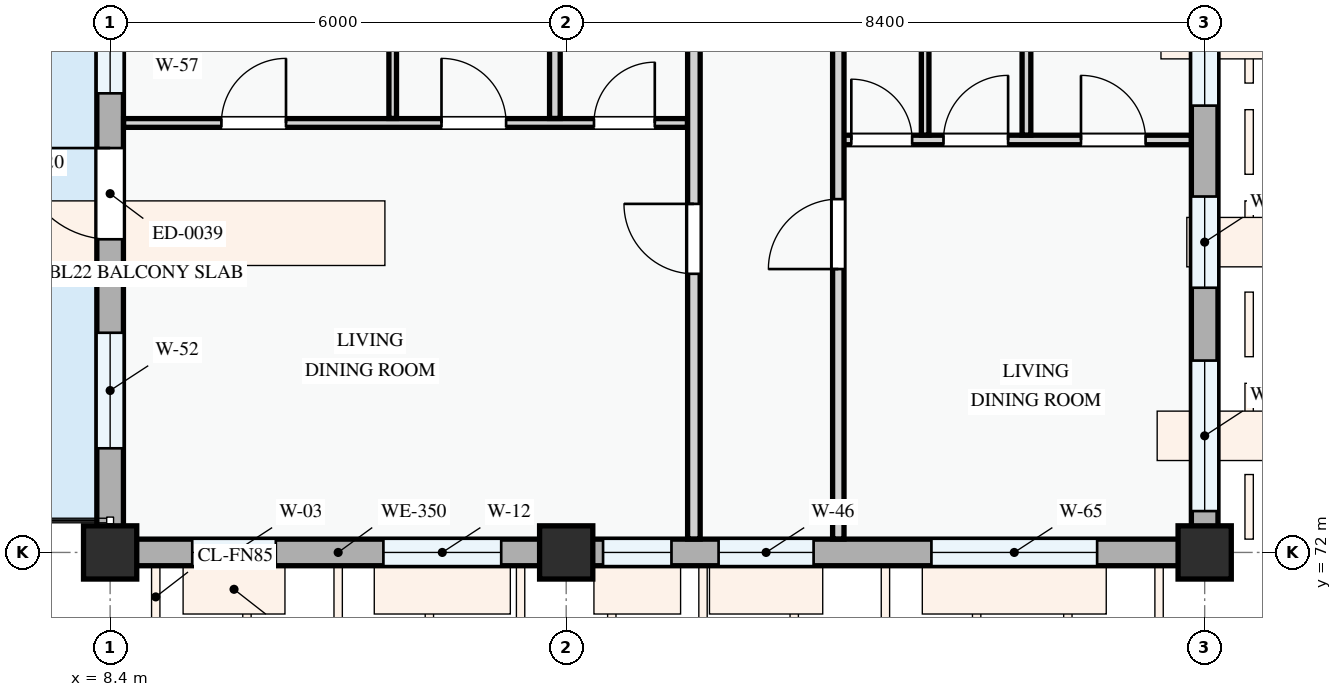
"""IFC4 building model, lengths in metres.
Left out: names, types, materials, properties, quantities, classifications, styles, units other than length and angle.
Written with IfcOpenShell. Run it as: python <this file> out.ifc"""

import sys

from ifc_helpers import new_model, si_unit, direction, frame, frame_2d, origin, origin_2d, place, context, subcontext, project, spatial, rectangle, extrude, element, fill, save


model = new_model("IFC4")
c1 = context("Model", 3, precision=1e-05, world=origin(), true_north=direction((0.0, 1.0)))
c2 = subcontext(c1, "Body", "Model", "MODEL_VIEW")
j1 = project(units=[si_unit("LENGTHUNIT", "METRE"), si_unit("PLANEANGLEUNIT", "RADIAN")], contexts=[c1])
p1 = place(None, origin())
s1 = spatial("IfcSite", under=j1, at=p1, CompositionType="ELEMENT")
p2 = place(p1, origin())
s2 = spatial("IfcBuilding", under=s1, at=p2, CompositionType="ELEMENT")
p3 = place(p2, frame((0.0, 0.0, 14.7)))
s3 = spatial("IfcBuildingStorey", under=s2, at=p3, CompositionType="ELEMENT", Elevation=14.7)
for number, where, z_axis, x_axis in (
    (1, (8.4, 72.0, 0.0), (0.0, 0.0, 1.0), (1.0, 0.0, 0.0)),
    (2, (14.4, 72.0, 0.0), (0.0, 0.0, 1.0), (1.0, 0.0, 0.0)),
    (3, (22.8, 72.0, 0.0), (0.0, 0.0, 1.0), (1.0, 0.0, 0.0)),
):
    element("IfcColumn", number, at=place(p3, frame(where, z_axis=z_axis, x_axis=x_axis)), inside=s3, PredefinedType="COLUMN", context=c2, shape_type="SweptSolid", body=[
        extrude(rectangle(XDim=0.7, YDim=0.7, at=origin_2d()), origin(), (0.0, 0.0, 1.0), 3.3),
    ])
p4 = place(p3, frame((8.4, 80.4, 0.0), z_axis=(0.0, 0.0, 1.0), x_axis=(0.0, -1.0, 0.0)))
e4 = element("IfcWall", 4, at=p4, inside=s3, PredefinedType="STANDARD", context=c2, shape_type="SweptSolid", body=[
    extrude(rectangle(XDim=8.4, YDim=0.35, at=frame_2d((4.2, 0.0))), origin(), (0.0, 0.0, 1.0), 2.345),
])
p5 = place(p4, frame((3.08, 0.0, 0.0)))
e5 = element("IfcOpeningElement", 5, at=p5, cuts=e4, PredefinedType="OPENING", context=c2, shape_type="SweptSolid", body=[
    extrude(rectangle(XDim=1.2, YDim=2.15, at=frame_2d((0.6, 1.075))), frame((0.0, 0.185, 0.0), z_axis=(0.0, -1.0, 0.0), x_axis=(1.0, 0.0, 0.0)), (0.0, 0.0, 1.0), 0.37),
])
p6 = place(p4, frame((0.58, 0.0, 0.78)))
e6 = element("IfcOpeningElement", 6, at=p6, cuts=e4, PredefinedType="OPENING", context=c2, shape_type="SweptSolid", body=[
    extrude(rectangle(XDim=1.78, YDim=1.42, at=frame_2d((0.89, 0.71))), frame((0.0, 0.185, 0.0), z_axis=(0.0, -1.0, 0.0), x_axis=(1.0, 0.0, 0.0)), (0.0, 0.0, 1.0), 0.37),
])
p7 = place(p4, frame((5.51, 0.0, 0.78)))
e7 = element("IfcOpeningElement", 7, at=p7, cuts=e4, PredefinedType="OPENING", context=c2, shape_type="SweptSolid", body=[
    extrude(rectangle(XDim=1.52, YDim=1.42, at=frame_2d((0.76, 0.71))), frame((0.0, 0.185, 0.0), z_axis=(0.0, -1.0, 0.0), x_axis=(1.0, 0.0, 0.0)), (0.0, 0.0, 1.0), 0.37),
])
p8 = place(p3, frame((8.4, 72.0, 0.0), z_axis=(0.0, 0.0, 1.0), x_axis=(1.0, 0.0, 0.0)))
e8 = element("IfcWall", 8, at=p8, inside=s3, PredefinedType="STANDARD", context=c2, shape_type="SweptSolid", body=[
    extrude(rectangle(XDim=6.0, YDim=0.35, at=frame_2d((3.0, 0.0))), origin(), (0.0, 0.0, 1.0), 2.475),
])
p9 = place(p8, frame((1.08, 0.0, 0.78)))
e9 = element("IfcOpeningElement", 9, at=p9, cuts=e8, PredefinedType="OPENING", context=c2, shape_type="SweptSolid", body=[
    extrude(rectangle(XDim=1.1, YDim=1.3, at=frame_2d((0.55, 0.65))), frame((0.0, 0.185, 0.0), z_axis=(0.0, -1.0, 0.0), x_axis=(1.0, 0.0, 0.0)), (0.0, 0.0, 1.0), 0.37),
])
p10 = place(p8, frame((3.595, 0.0, 0.78)))
e10 = element("IfcOpeningElement", 10, at=p10, cuts=e8, PredefinedType="OPENING", context=c2, shape_type="SweptSolid", body=[
    extrude(rectangle(XDim=1.55, YDim=1.4, at=frame_2d((0.775, 0.7))), frame((0.0, 0.185, 0.0), z_axis=(0.0, -1.0, 0.0), x_axis=(1.0, 0.0, 0.0)), (0.0, 0.0, 1.0), 0.37),
])
p11 = place(p3, frame((14.4, 72.0, 0.0), z_axis=(0.0, 0.0, 1.0), x_axis=(1.0, 0.0, 0.0)))
e11 = element("IfcWall", 11, at=p11, inside=s3, PredefinedType="STANDARD", context=c2, shape_type="SweptSolid", body=[
    extrude(rectangle(XDim=8.4, YDim=0.35, at=frame_2d((4.2, 0.0))), origin(), (0.0, 0.0, 1.0), 2.375),
])
p12 = place(p11, frame((0.485, 0.0, 0.78)))
e12 = element("IfcOpeningElement", 12, at=p12, cuts=e11, PredefinedType="OPENING", context=c2, shape_type="SweptSolid", body=[
    extrude(rectangle(XDim=0.9, YDim=1.2, at=frame_2d((0.45, 0.6))), frame((0.0, 0.185, 0.0), z_axis=(0.0, -1.0, 0.0), x_axis=(1.0, 0.0, 0.0)), (0.0, 0.0, 1.0), 0.37),
])
p13 = place(p11, frame((2.005, 0.0, 0.78)))
e13 = element("IfcOpeningElement", 13, at=p13, cuts=e11, PredefinedType="OPENING", context=c2, shape_type="SweptSolid", body=[
    extrude(rectangle(XDim=1.25, YDim=1.3, at=frame_2d((0.625, 0.65))), frame((0.0, 0.185, 0.0), z_axis=(0.0, -1.0, 0.0), x_axis=(1.0, 0.0, 0.0)), (0.0, 0.0, 1.0), 0.37),
])
p14 = place(p11, frame((4.805, 0.0, 0.78)))
e14 = element("IfcOpeningElement", 14, at=p14, cuts=e11, PredefinedType="OPENING", context=c2, shape_type="SweptSolid", body=[
    extrude(rectangle(XDim=2.18, YDim=1.48, at=frame_2d((1.09, 0.74))), frame((0.0, 0.185, 0.0), z_axis=(0.0, -1.0, 0.0), x_axis=(1.0, 0.0, 0.0)), (0.0, 0.0, 1.0), 0.37),
])
p15 = place(p3, frame((22.8, 72.0, 0.0), z_axis=(0.0, 0.0, 1.0), x_axis=(0.0, 1.0, 0.0)))
e15 = element("IfcWall", 15, at=p15, inside=s3, PredefinedType="STANDARD", context=c2, shape_type="SweptSolid", body=[
    extrude(rectangle(XDim=8.4, YDim=0.35, at=frame_2d((4.2, 0.0))), origin(), (0.0, 0.0, 1.0), 2.425),
])
p16 = place(p15, frame((0.544, 0.0, 0.78)))
e16 = element("IfcOpeningElement", 16, at=p16, cuts=e15, PredefinedType="OPENING", context=c2, shape_type="SweptSolid", body=[
    extrude(rectangle(XDim=1.98, YDim=1.5, at=frame_2d((0.99, 0.75))), frame((0.0, 0.185, 0.0), z_axis=(0.0, -1.0, 0.0), x_axis=(1.0, 0.0, 0.0)), (0.0, 0.0, 1.0), 0.37),
])
p17 = place(p15, frame((3.482, 0.0, 0.78)))
e17 = element("IfcOpeningElement", 17, at=p17, cuts=e15, PredefinedType="OPENING", context=c2, shape_type="SweptSolid", body=[
    extrude(rectangle(XDim=1.2, YDim=1.35, at=frame_2d((0.6, 0.675))), frame((0.0, 0.185, 0.0), z_axis=(0.0, -1.0, 0.0), x_axis=(1.0, 0.0, 0.0)), (0.0, 0.0, 1.0), 0.37),
])
p18 = place(p15, frame((5.878, 0.0, 0.78)))
e18 = element("IfcOpeningElement", 18, at=p18, cuts=e15, PredefinedType="OPENING", context=c2, shape_type="SweptSolid", body=[
    extrude(rectangle(XDim=1.88, YDim=1.52, at=frame_2d((0.94, 0.76))), frame((0.0, 0.185, 0.0), z_axis=(0.0, -1.0, 0.0), x_axis=(1.0, 0.0, 0.0)), (0.0, 0.0, 1.0), 0.37),
])
p19 = place(p3, frame((8.577, 77.65, 0.0), z_axis=(0.0, 0.0, 1.0), x_axis=(1.0, 0.0, 0.0)))
e19 = element("IfcWall", 19, at=p19, inside=s3, PredefinedType="PARTITIONING", context=c2, shape_type="SweptSolid", body=[
    extrude(rectangle(XDim=7.419, YDim=0.115, at=frame_2d((3.709, 0.0))), origin(), (0.0, 0.0, 1.0), 3.0),
])
p20 = place(p19, frame((1.287, 0.0, 0.0)))
e20 = element("IfcOpeningElement", 20, at=p20, cuts=e19, PredefinedType="OPENING", context=c2, shape_type="SweptSolid", body=[
    extrude(rectangle(XDim=0.85, YDim=2.1, at=frame_2d((0.425, 1.05))), frame((0.0, 0.067, 0.0), z_axis=(0.0, -1.0, 0.0), x_axis=(1.0, 0.0, 0.0)), (0.0, 0.0, 1.0), 0.135),
])
p21 = place(p19, frame((4.182, 0.0, 0.0)))
e21 = element("IfcOpeningElement", 21, at=p21, cuts=e19, PredefinedType="OPENING", context=c2, shape_type="SweptSolid", body=[
    extrude(rectangle(XDim=0.85, YDim=2.1, at=frame_2d((0.425, 1.05))), frame((0.0, 0.067, 0.0), z_axis=(0.0, -1.0, 0.0), x_axis=(1.0, 0.0, 0.0)), (0.0, 0.0, 1.0), 0.135),
])
p22 = place(p19, frame((6.189, 0.0, 0.0)))
e22 = element("IfcOpeningElement", 22, at=p22, cuts=e19, PredefinedType="OPENING", context=c2, shape_type="SweptSolid", body=[
    extrude(rectangle(XDim=0.8, YDim=2.1, at=frame_2d((0.4, 1.05))), frame((0.0, 0.067, 0.0), z_axis=(0.0, -1.0, 0.0), x_axis=(1.0, 0.0, 0.0)), (0.0, 0.0, 1.0), 0.135),
])
p23 = place(p3, frame((12.118, 77.709, 0.0), z_axis=(0.0, 0.0, 1.0), x_axis=(0.0, 1.0, 0.0)))
e23 = element("IfcWall", 23, at=p23, inside=s3, PredefinedType="PARTITIONING", context=c2, shape_type="SweptSolid", body=[
    extrude(rectangle(XDim=5.436, YDim=0.1, at=frame_2d((2.718, 0.0))), origin(), (0.0, 0.0, 1.0), 3.0),
])
p24 = place(p3, frame((14.251, 77.709, 0.0), z_axis=(0.0, 0.0, 1.0), x_axis=(0.0, 1.0, 0.0)))
e24 = element("IfcWall", 24, at=p24, inside=s3, PredefinedType="PARTITIONING", context=c2, shape_type="SweptSolid", body=[
    extrude(rectangle(XDim=5.436, YDim=0.14, at=frame_2d((2.718, 0.0))), origin(), (0.0, 0.0, 1.0), 2.425),
])
p25 = place(p3, frame((17.98, 77.427, 0.0), z_axis=(0.0, 0.0, 1.0), x_axis=(1.0, 0.0, 0.0)))
e25 = element("IfcWall", 25, at=p25, inside=s3, PredefinedType="PARTITIONING", context=c2, shape_type="SweptSolid", body=[
    extrude(rectangle(XDim=4.643, YDim=0.125, at=frame_2d((2.322, 0.0))), origin(), (0.0, 0.0, 1.0), 3.0),
])
p26 = place(p25, frame((0.171, 0.0, 0.0)))
e26 = element("IfcOpeningElement", 26, at=p26, cuts=e25, PredefinedType="OPENING", context=c2, shape_type="SweptSolid", body=[
    extrude(rectangle(XDim=0.8, YDim=2.1, at=frame_2d((0.4, 1.05))), frame((0.0, 0.073, 0.0), z_axis=(0.0, -1.0, 0.0), x_axis=(1.0, 0.0, 0.0)), (0.0, 0.0, 1.0), 0.145),
])
p27 = place(p25, frame((1.384, 0.0, 0.0)))
e27 = element("IfcOpeningElement", 27, at=p27, cuts=e25, PredefinedType="OPENING", context=c2, shape_type="SweptSolid", body=[
    extrude(rectangle(XDim=0.85, YDim=2.1, at=frame_2d((0.425, 1.05))), frame((0.0, 0.073, 0.0), z_axis=(0.0, -1.0, 0.0), x_axis=(1.0, 0.0, 0.0)), (0.0, 0.0, 1.0), 0.145),
])
p28 = place(p25, frame((3.193, 0.0, 0.0)))
e28 = element("IfcOpeningElement", 28, at=p28, cuts=e25, PredefinedType="OPENING", context=c2, shape_type="SweptSolid", body=[
    extrude(rectangle(XDim=0.85, YDim=2.1, at=frame_2d((0.425, 1.05))), frame((0.0, 0.073, 0.0), z_axis=(0.0, -1.0, 0.0), x_axis=(1.0, 0.0, 0.0)), (0.0, 0.0, 1.0), 0.145),
])
p29 = place(p3, frame((20.455, 77.491, 0.0), z_axis=(0.0, 0.0, 1.0), x_axis=(0.0, 1.0, 0.0)))
e29 = element("IfcWall", 29, at=p29, inside=s3, PredefinedType="PARTITIONING", context=c2, shape_type="SweptSolid", body=[
    extrude(rectangle(XDim=5.647, YDim=0.115, at=frame_2d((2.823, 0.0))), origin(), (0.0, 0.0, 1.0), 3.0),
])
p30 = place(p3, frame((19.122, 77.491, 0.0), z_axis=(0.0, 0.0, 1.0), x_axis=(0.0, 1.0, 0.0)))
e30 = element("IfcWall", 30, at=p30, inside=s3, PredefinedType="PARTITIONING", context=c2, shape_type="SweptSolid", body=[
    extrude(rectangle(XDim=5.647, YDim=0.1, at=frame_2d((2.823, 0.0))), origin(), (0.0, 0.0, 1.0), 3.0),
])
p31 = place(p3, frame((16.08, 72.177, 0.0), z_axis=(0.0, 0.0, 1.0), x_axis=(0.0, 1.0, 0.0)))
e31 = element("IfcWall", 31, at=p31, inside=s3, PredefinedType="PARTITIONING", context=c2, shape_type="SweptSolid", body=[
    extrude(rectangle(XDim=37.163, YDim=0.165, at=frame_2d((18.582, 0.0))), origin(), (0.0, 0.0, 1.0), 3.0),
])
p32 = place(p31, frame((3.489, 0.0, 0.0)))
e32 = element("IfcOpeningElement", 32, at=p32, cuts=e31, PredefinedType="OPENING", context=c2, shape_type="SweptSolid", body=[
    extrude(rectangle(XDim=0.92, YDim=2.1, at=frame_2d((0.46, 1.05))), frame((0.0, 0.093, 0.0), z_axis=(0.0, -1.0, 0.0), x_axis=(1.0, 0.0, 0.0)), (0.0, 0.0, 1.0), 0.185),
])
p33 = place(p31, frame((16.543, 0.0, 0.0)))
e33 = element("IfcOpeningElement", 33, at=p33, cuts=e31, PredefinedType="OPENING", context=c2, shape_type="SweptSolid", body=[
    extrude(rectangle(XDim=0.92, YDim=2.1, at=frame_2d((0.46, 1.05))), frame((0.0, 0.093, 0.0), z_axis=(0.0, -1.0, 0.0), x_axis=(1.0, 0.0, 0.0)), (0.0, 0.0, 1.0), 0.185),
])
p34 = place(p31, frame((25.152, 0.0, 0.0)))
e34 = element("IfcOpeningElement", 34, at=p34, cuts=e31, PredefinedType="OPENING", context=c2, shape_type="SweptSolid", body=[
    extrude(rectangle(XDim=0.92, YDim=2.1, at=frame_2d((0.46, 1.05))), frame((0.0, 0.093, 0.0), z_axis=(0.0, -1.0, 0.0), x_axis=(1.0, 0.0, 0.0)), (0.0, 0.0, 1.0), 0.185),
])
p35 = place(p3, frame((17.98, 72.177, 0.0), z_axis=(0.0, 0.0, 1.0), x_axis=(0.0, 1.0, 0.0)))
e35 = element("IfcWall", 35, at=p35, inside=s3, PredefinedType="PARTITIONING", context=c2, shape_type="SweptSolid", body=[
    extrude(rectangle(XDim=37.163, YDim=0.15, at=frame_2d((18.582, 0.0))), origin(), (0.0, 0.0, 1.0), 3.0),
])
p36 = place(p35, frame((3.551, 0.0, 0.0)))
e36 = element("IfcOpeningElement", 36, at=p36, cuts=e35, PredefinedType="OPENING", context=c2, shape_type="SweptSolid", body=[
    extrude(rectangle(XDim=0.92, YDim=2.1, at=frame_2d((0.46, 1.05))), frame((0.0, 0.085, 0.0), z_axis=(0.0, -1.0, 0.0), x_axis=(1.0, 0.0, 0.0)), (0.0, 0.0, 1.0), 0.17),
])
p37 = place(p35, frame((16.275, 0.0, 0.0)))
e37 = element("IfcOpeningElement", 37, at=p37, cuts=e35, PredefinedType="OPENING", context=c2, shape_type="SweptSolid", body=[
    extrude(rectangle(XDim=0.96, YDim=2.12, at=frame_2d((0.48, 1.06))), frame((0.0, 0.085, 0.0), z_axis=(0.0, -1.0, 0.0), x_axis=(1.0, 0.0, 0.0)), (0.0, 0.0, 1.0), 0.17),
])
p38 = place(p35, frame((25.128, 0.0, 0.0)))
e38 = element("IfcOpeningElement", 38, at=p38, cuts=e35, PredefinedType="OPENING", context=c2, shape_type="SweptSolid", body=[
    extrude(rectangle(XDim=0.92, YDim=2.1, at=frame_2d((0.46, 1.05))), frame((0.0, 0.085, 0.0), z_axis=(0.0, -1.0, 0.0), x_axis=(1.0, 0.0, 0.0)), (0.0, 0.0, 1.0), 0.17),
])
p39 = place(p5, frame((1.2, 0.0, 0.0), z_axis=(0.0, 0.0, 1.0), x_axis=(-1.0, 0.0, 0.0)))
e39 = element("IfcDoor", 39, at=p39, inside=s3, OperationType="SINGLE_SWING_RIGHT", PredefinedType="DOOR", context=c2, shape_type="SweptSolid", body=[
    extrude(rectangle(XDim=1.2, YDim=2.15, at=frame_2d((0.6, 1.075))), frame((0.0, 0.025, 0.0), z_axis=(0.0, -1.0, 0.0), x_axis=(1.0, 0.0, 0.0)), (0.0, 0.0, 1.0), 0.05),
])
fill(e5, e39)
p40 = place(p6, origin())
e40 = element("IfcWindow", 40, at=p40, inside=s3, PartitioningType="DOUBLE_PANEL_VERTICAL", PredefinedType="WINDOW", context=c2, shape_type="SweptSolid", body=[
    extrude(rectangle(XDim=1.78, YDim=1.42, at=frame_2d((0.89, 0.71))), frame((0.0, 0.03, 0.0), z_axis=(0.0, -1.0, 0.0), x_axis=(1.0, 0.0, 0.0)), (0.0, 0.0, 1.0), 0.06),
])
fill(e6, e40)
p41 = place(p7, origin())
e41 = element("IfcWindow", 41, at=p41, inside=s3, PartitioningType="SINGLE_PANEL", PredefinedType="WINDOW", context=c2, shape_type="SweptSolid", body=[
    extrude(rectangle(XDim=1.52, YDim=1.42, at=frame_2d((0.76, 0.71))), frame((0.0, 0.03, 0.0), z_axis=(0.0, -1.0, 0.0), x_axis=(1.0, 0.0, 0.0)), (0.0, 0.0, 1.0), 0.06),
])
fill(e7, e41)
p42 = place(p9, origin())
e42 = element("IfcWindow", 42, at=p42, inside=s3, PartitioningType="SINGLE_PANEL", PredefinedType="WINDOW", context=c2, shape_type="SweptSolid", body=[
    extrude(rectangle(XDim=1.1, YDim=1.3, at=frame_2d((0.55, 0.65))), frame((0.0, 0.03, 0.0), z_axis=(0.0, -1.0, 0.0), x_axis=(1.0, 0.0, 0.0)), (0.0, 0.0, 1.0), 0.06),
])
fill(e9, e42)
p43 = place(p10, origin())
e43 = element("IfcWindow", 43, at=p43, inside=s3, PartitioningType="SINGLE_PANEL", PredefinedType="WINDOW", context=c2, shape_type="SweptSolid", body=[
    extrude(rectangle(XDim=1.55, YDim=1.4, at=frame_2d((0.775, 0.7))), frame((0.0, 0.03, 0.0), z_axis=(0.0, -1.0, 0.0), x_axis=(1.0, 0.0, 0.0)), (0.0, 0.0, 1.0), 0.06),
])
fill(e10, e43)
p44 = place(p12, origin())
e44 = element("IfcWindow", 44, at=p44, inside=s3, PartitioningType="SINGLE_PANEL", PredefinedType="WINDOW", context=c2, shape_type="SweptSolid", body=[
    extrude(rectangle(XDim=0.9, YDim=1.2, at=frame_2d((0.45, 0.6))), frame((0.0, 0.03, 0.0), z_axis=(0.0, -1.0, 0.0), x_axis=(1.0, 0.0, 0.0)), (0.0, 0.0, 1.0), 0.06),
])
fill(e12, e44)
p45 = place(p13, origin())
e45 = element("IfcWindow", 45, at=p45, inside=s3, PartitioningType="SINGLE_PANEL", PredefinedType="WINDOW", context=c2, shape_type="SweptSolid", body=[
    extrude(rectangle(XDim=1.25, YDim=1.3, at=frame_2d((0.625, 0.65))), frame((0.0, 0.03, 0.0), z_axis=(0.0, -1.0, 0.0), x_axis=(1.0, 0.0, 0.0)), (0.0, 0.0, 1.0), 0.06),
])
fill(e13, e45)
p46 = place(p14, origin())
e46 = element("IfcWindow", 46, at=p46, inside=s3, PartitioningType="DOUBLE_PANEL_VERTICAL", PredefinedType="WINDOW", context=c2, shape_type="SweptSolid", body=[
    extrude(rectangle(XDim=2.18, YDim=1.48, at=frame_2d((1.09, 0.74))), frame((0.0, 0.03, 0.0), z_axis=(0.0, -1.0, 0.0), x_axis=(1.0, 0.0, 0.0)), (0.0, 0.0, 1.0), 0.06),
])
fill(e14, e46)
p47 = place(p16, origin())
e47 = element("IfcWindow", 47, at=p47, inside=s3, PartitioningType="DOUBLE_PANEL_VERTICAL", PredefinedType="WINDOW", context=c2, shape_type="SweptSolid", body=[
    extrude(rectangle(XDim=1.98, YDim=1.5, at=frame_2d((0.99, 0.75))), frame((0.0, 0.03, 0.0), z_axis=(0.0, -1.0, 0.0), x_axis=(1.0, 0.0, 0.0)), (0.0, 0.0, 1.0), 0.06),
])
fill(e16, e47)
p48 = place(p17, origin())
e48 = element("IfcWindow", 48, at=p48, inside=s3, PartitioningType="SINGLE_PANEL", PredefinedType="WINDOW", context=c2, shape_type="SweptSolid", body=[
    extrude(rectangle(XDim=1.2, YDim=1.35, at=frame_2d((0.6, 0.675))), frame((0.0, 0.03, 0.0), z_axis=(0.0, -1.0, 0.0), x_axis=(1.0, 0.0, 0.0)), (0.0, 0.0, 1.0), 0.06),
])
fill(e17, e48)
p49 = place(p18, origin())
e49 = element("IfcWindow", 49, at=p49, inside=s3, PartitioningType="DOUBLE_PANEL_VERTICAL", PredefinedType="WINDOW", context=c2, shape_type="SweptSolid", body=[
    extrude(rectangle(XDim=1.88, YDim=1.52, at=frame_2d((0.94, 0.76))), frame((0.0, 0.03, 0.0), z_axis=(0.0, -1.0, 0.0), x_axis=(1.0, 0.0, 0.0)), (0.0, 0.0, 1.0), 0.06),
])
fill(e18, e49)
p50 = place(p20, origin())
e50 = element("IfcDoor", 50, at=p50, inside=s3, OperationType="SINGLE_SWING_RIGHT", PredefinedType="DOOR", context=c2, shape_type="SweptSolid", body=[
    extrude(rectangle(XDim=0.85, YDim=2.1, at=frame_2d((0.425, 1.05))), frame((0.0, 0.025, 0.0), z_axis=(0.0, -1.0, 0.0), x_axis=(1.0, 0.0, 0.0)), (0.0, 0.0, 1.0), 0.05),
])
fill(e20, e50)
p51 = place(p21, origin())
e51 = element("IfcDoor", 51, at=p51, inside=s3, OperationType="SINGLE_SWING_LEFT", PredefinedType="DOOR", context=c2, shape_type="SweptSolid", body=[
    extrude(rectangle(XDim=0.85, YDim=2.1, at=frame_2d((0.425, 1.05))), frame((0.0, 0.025, 0.0), z_axis=(0.0, -1.0, 0.0), x_axis=(1.0, 0.0, 0.0)), (0.0, 0.0, 1.0), 0.05),
])
fill(e21, e51)
p52 = place(p22, origin())
e52 = element("IfcDoor", 52, at=p52, inside=s3, OperationType="SINGLE_SWING_RIGHT", PredefinedType="DOOR", context=c2, shape_type="SweptSolid", body=[
    extrude(rectangle(XDim=0.8, YDim=2.1, at=frame_2d((0.4, 1.05))), frame((0.0, 0.025, 0.0), z_axis=(0.0, -1.0, 0.0), x_axis=(1.0, 0.0, 0.0)), (0.0, 0.0, 1.0), 0.05),
])
fill(e22, e52)
p53 = place(p26, origin())
e53 = element("IfcDoor", 53, at=p53, inside=s3, OperationType="SINGLE_SWING_LEFT", PredefinedType="DOOR", context=c2, shape_type="SweptSolid", body=[
    extrude(rectangle(XDim=0.8, YDim=2.1, at=frame_2d((0.4, 1.05))), frame((0.0, 0.025, 0.0), z_axis=(0.0, -1.0, 0.0), x_axis=(1.0, 0.0, 0.0)), (0.0, 0.0, 1.0), 0.05),
])
fill(e26, e53)
p54 = place(p27, origin())
e54 = element("IfcDoor", 54, at=p54, inside=s3, OperationType="SINGLE_SWING_RIGHT", PredefinedType="DOOR", context=c2, shape_type="SweptSolid", body=[
    extrude(rectangle(XDim=0.85, YDim=2.1, at=frame_2d((0.425, 1.05))), frame((0.0, 0.025, 0.0), z_axis=(0.0, -1.0, 0.0), x_axis=(1.0, 0.0, 0.0)), (0.0, 0.0, 1.0), 0.05),
])
fill(e27, e54)
p55 = place(p28, origin())
e55 = element("IfcDoor", 55, at=p55, inside=s3, OperationType="SINGLE_SWING_LEFT", PredefinedType="DOOR", context=c2, shape_type="SweptSolid", body=[
    extrude(rectangle(XDim=0.85, YDim=2.1, at=frame_2d((0.425, 1.05))), frame((0.0, 0.025, 0.0), z_axis=(0.0, -1.0, 0.0), x_axis=(1.0, 0.0, 0.0)), (0.0, 0.0, 1.0), 0.05),
])
fill(e28, e55)
p56 = place(p32, origin())
e56 = element("IfcDoor", 56, at=p56, inside=s3, OperationType="SINGLE_SWING_RIGHT", PredefinedType="DOOR", context=c2, shape_type="SweptSolid", body=[
    extrude(rectangle(XDim=0.92, YDim=2.1, at=frame_2d((0.46, 1.05))), frame((0.0, 0.025, 0.0), z_axis=(0.0, -1.0, 0.0), x_axis=(1.0, 0.0, 0.0)), (0.0, 0.0, 1.0), 0.05),
])
fill(e32, e56)
p57 = place(p36, origin())
e57 = element("IfcDoor", 57, at=p57, inside=s3, OperationType="SINGLE_SWING_LEFT", PredefinedType="DOOR", context=c2, shape_type="SweptSolid", body=[
    extrude(rectangle(XDim=0.92, YDim=2.1, at=frame_2d((0.46, 1.05))), frame((0.0, 0.025, 0.0), z_axis=(0.0, -1.0, 0.0), x_axis=(1.0, 0.0, 0.0)), (0.0, 0.0, 1.0), 0.05),
])
fill(e36, e57)
save(model, sys.argv[1])
